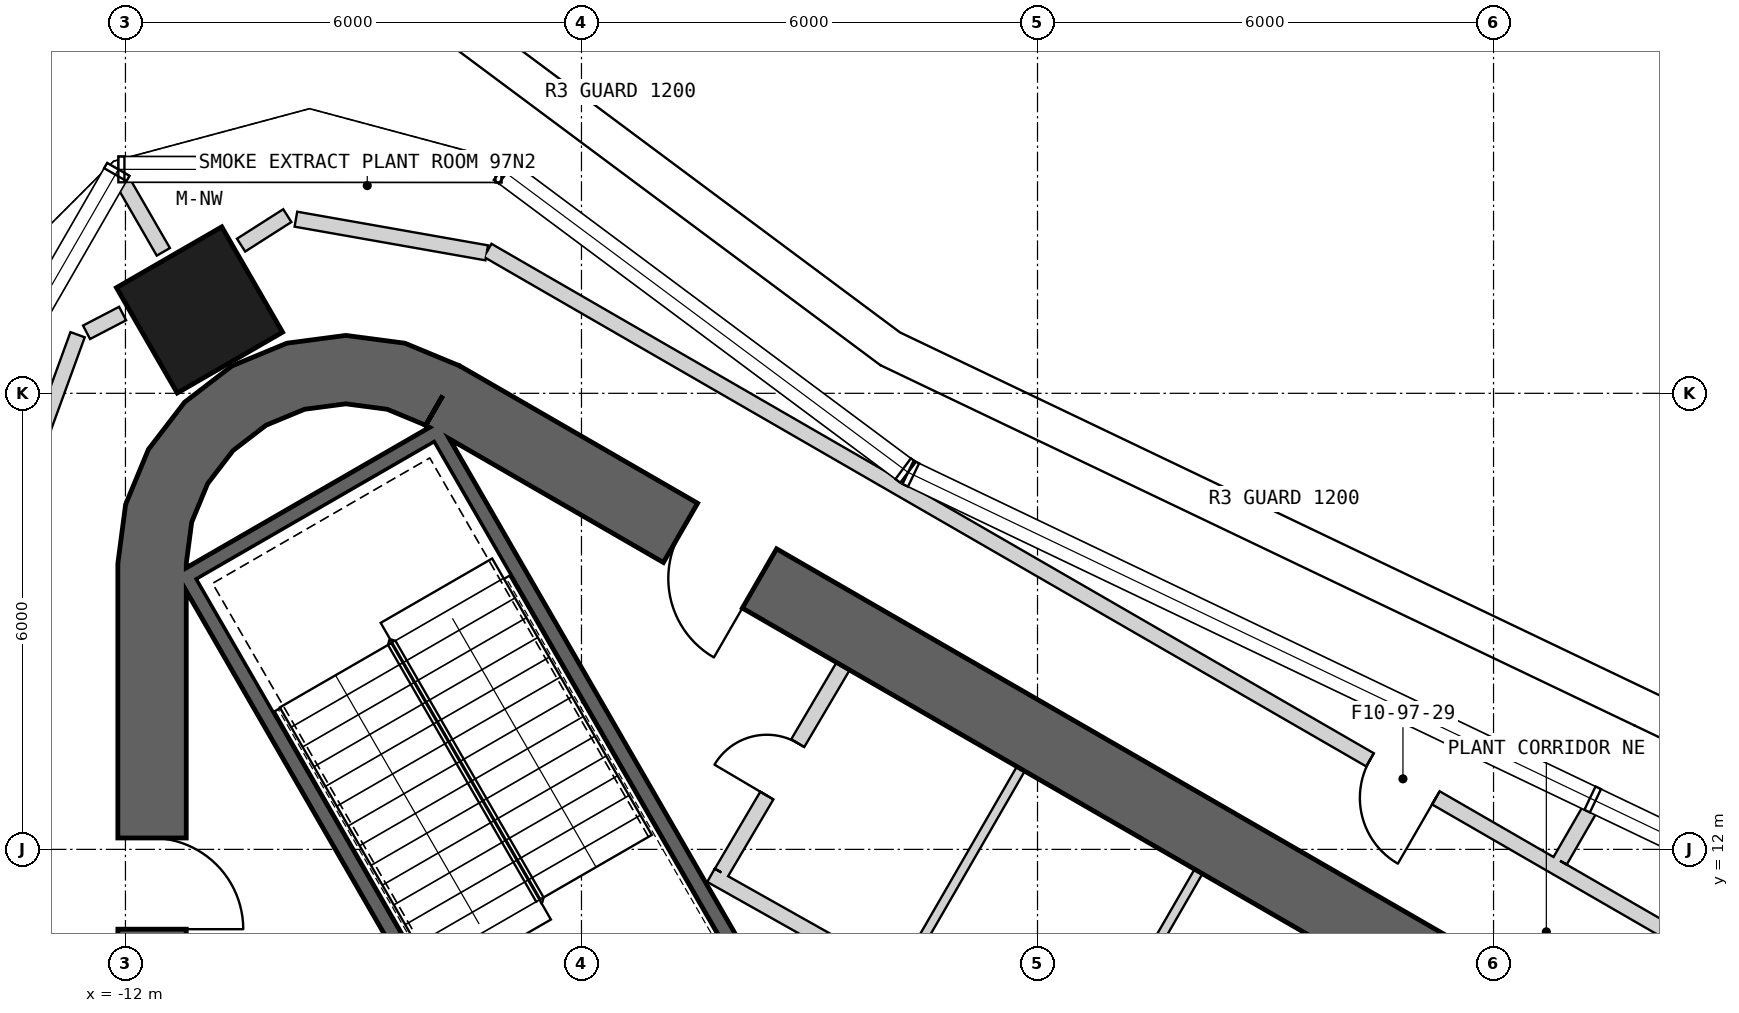
"""IFC4 building model, lengths in metres.
Left out: names, types, materials, properties, quantities, classifications, styles, units other than length and angle.
Written with IfcOpenShell. Run it as: python <this file> out.ifc"""

import sys

from ifc_helpers import new_model, si_unit, direction, frame, frame_2d, origin, origin_2d, place, context, subcontext, project, spatial, polyline, rectangle, outline, extrude, element, fill, save


model = new_model("IFC4")
c1 = context("Model", 3, precision=1e-05, world=origin(), true_north=direction((0.0, 1.0)))
c2 = subcontext(c1, "Body", "Model", "MODEL_VIEW")
j1 = project(units=[si_unit("LENGTHUNIT", "METRE"), si_unit("PLANEANGLEUNIT", "RADIAN")], contexts=[c1])
p1 = place(None, origin())
s1 = spatial("IfcSite", under=j1, at=p1, CompositionType="ELEMENT")
p2 = place(p1, origin())
s2 = spatial("IfcBuilding", under=s1, at=p2, CompositionType="ELEMENT")
p3 = place(p2, frame((0.0, 0.0, 430.3)))
s3 = spatial("IfcBuildingStorey", under=s2, at=p3, CompositionType="ELEMENT", Elevation=430.3)
p4 = place(p3, frame((-11.025, 19.097, 0.0), z_axis=(0.0, 0.0, 1.0), x_axis=(-0.5, 0.866025403784, 0.0)))
e1 = element("IfcColumn", 1, at=p4, inside=s3, PredefinedType="COLUMN", context=c2, shape_type="SweptSolid", body=[
    extrude(rectangle(XDim=1.6, YDim=1.6, at=origin_2d()), origin(), (0.0, 0.0, 1.0), 5.0),
])
p5 = place(p3, frame((19.475, 2.208, 0.0), z_axis=(0.0, 0.0, 1.0), x_axis=(-0.866028369851, 0.499994862586, 0.0)))
e2 = element("IfcWall", 2, at=p5, inside=s3, PredefinedType="SHEAR", context=c2, shape_type="SweptSolid", body=[
    extrude(rectangle(XDim=31.523, YDim=0.9, at=frame_2d((15.762, 0.0))), origin(), (0.0, 0.0, 1.0), 5.0),
])
p6 = place(p5, frame((3.612, 0.0, 0.0)))
e3 = element("IfcOpeningElement", 3, at=p6, cuts=e2, PredefinedType="OPENING", context=c2, shape_type="SweptSolid", body=[
    extrude(rectangle(XDim=1.2, YDim=2.4, at=frame_2d((0.6, 1.2))), frame((0.0, 0.46, 0.0), z_axis=(0.0, -1.0, 0.0), x_axis=(1.0, 0.0, 0.0)), (0.0, 0.0, 1.0), 0.92),
])
p7 = place(p5, frame((26.712, 0.0, 0.0)))
e4 = element("IfcOpeningElement", 4, at=p7, cuts=e2, PredefinedType="OPENING", context=c2, shape_type="SweptSolid", body=[
    extrude(rectangle(XDim=1.2, YDim=2.4, at=frame_2d((0.6, 1.2))), frame((0.0, 0.46, 0.0), z_axis=(0.0, -1.0, 0.0), x_axis=(1.0, 0.0, 0.0)), (0.0, 0.0, 1.0), 0.92),
])
p8 = place(p3, frame((-11.65, 15.762, 0.0), z_axis=(0.0, 0.0, 1.0), x_axis=(0.0, -1.0, 0.0)))
e5 = element("IfcWall", 5, at=p8, inside=s3, PredefinedType="SHEAR", context=c2, shape_type="SweptSolid", body=[
    extrude(rectangle(XDim=31.523, YDim=0.9, at=frame_2d((15.762, 0.0))), origin(), (0.0, 0.0, 1.0), 5.0),
])
p9 = place(p8, frame((3.612, 0.0, 0.0)))
e6 = element("IfcOpeningElement", 6, at=p9, cuts=e5, PredefinedType="OPENING", context=c2, shape_type="SweptSolid", body=[
    extrude(rectangle(XDim=1.2, YDim=2.4, at=frame_2d((0.6, 1.2))), frame((0.0, 0.46, 0.0), z_axis=(0.0, -1.0, 0.0), x_axis=(1.0, 0.0, 0.0)), (0.0, 0.0, 1.0), 0.92),
])
p10 = place(p8, frame((26.712, 0.0, 0.0)))
e7 = element("IfcOpeningElement", 7, at=p10, cuts=e5, PredefinedType="OPENING", context=c2, shape_type="SweptSolid", body=[
    extrude(rectangle(XDim=1.2, YDim=2.4, at=frame_2d((0.6, 1.2))), frame((0.0, 0.46, 0.0), z_axis=(0.0, -1.0, 0.0), x_axis=(1.0, 0.0, 0.0)), (0.0, 0.0, 1.0), 0.92),
])
p11 = place(p3, origin())
e8 = element("IfcWall", 8, at=p11, inside=s3, PredefinedType="SHEAR", context=c2, shape_type="SweptSolid", body=[
    extrude(outline(polyline([(-7.6, 18.36), (-8.323, 18.659), (-9.1, 18.762), (-9.876, 18.659), (-10.6, 18.36), (-11.221, 17.883), (-11.698, 17.262), (-11.998, 16.538), (-12.1, 15.762), (-11.2, 15.762), (-11.128, 16.305), (-10.919, 16.812), (-10.585, 17.247), (-10.15, 17.58), (-9.644, 17.79), (-9.1, 17.862), (-8.556, 17.79), (-8.05, 17.58), (-7.6, 18.36)])), origin(), (0.0, 0.0, 1.0), 5.0),
])
p12 = place(p3, frame((-11.245, 15.678, -0.25), z_axis=(0.0, 0.0, 1.0), x_axis=(0.499977274689, -0.866038523851, 0.0)))
e9 = element("IfcWall", 9, at=p12, inside=s3, PredefinedType="SHEAR", context=c2, shape_type="SweptSolid", body=[
    extrude(rectangle(XDim=8.1, YDim=0.2, at=frame_2d((4.05, 0.0))), origin(), (0.0, 0.0, 1.0), 5.0),
])
p13 = place(p3, frame((-7.818, 17.541, -0.25), z_axis=(0.0, 0.0, 1.0), x_axis=(-0.866044365799, -0.499967155389, 0.0)))
e10 = element("IfcWall", 10, at=p13, inside=s3, PredefinedType="SHEAR", context=c2, shape_type="SweptSolid", body=[
    extrude(rectangle(XDim=3.8, YDim=0.2, at=frame_2d((1.9, 0.0))), origin(), (0.0, 0.0, 1.0), 5.0),
])
p14 = place(p3, frame((-7.854, 17.405, -0.25), z_axis=(0.0, 0.0, 1.0), x_axis=(0.499997992926, -0.866026562566, 0.0)))
e11 = element("IfcWall", 11, at=p14, inside=s3, PredefinedType="SHEAR", context=c2, shape_type="SweptSolid", body=[
    extrude(rectangle(XDim=7.9, YDim=0.2, at=frame_2d((3.95, 0.0))), origin(), (0.0, 0.0, 1.0), 5.0),
])
for number, where, z_axis, x_axis in (
    (12, (2.119, 11.709, 0.0), (0.0, 0.0, 1.0), (-0.5, -0.866, 0.0)),
    (13, (-0.22, 13.06, 0.0), (0.0, 0.0, 1.0), (-0.5, -0.866, 0.0)),
):
    element("IfcWall", number, at=place(p3, frame(where, z_axis=z_axis, x_axis=x_axis)), inside=s3, PredefinedType="PARTITIONING", context=c2, shape_type="SweptSolid", body=[
        extrude(rectangle(XDim=3.25, YDim=0.12, at=frame_2d((1.625, 0.0))), origin(), (0.0, 0.0, 1.0), 4.75),
    ])
p15 = place(p3, frame((-4.296, 11.659, 0.0), z_axis=(0.0, 0.0, 1.0), x_axis=(0.871534483978, -0.490334215854, 0.0)))
e14 = element("IfcWall", 14, at=p15, inside=s3, PredefinedType="PARTITIONING", context=c2, shape_type="SweptSolid", body=[
    extrude(rectangle(XDim=2.7, YDim=0.2, at=frame_2d((1.35, 0.0))), origin(), (0.0, 0.0, 1.0), 4.75),
])
p16 = place(p3, frame((-2.558, 14.409, 0.0), z_axis=(0.0, 0.0, 1.0), x_axis=(-0.508018930956, -0.861345903683, 0.0)))
e15 = element("IfcWall", 15, at=p16, inside=s3, PredefinedType="PARTITIONING", context=c2, shape_type="SweptSolid", body=[
    extrude(rectangle(XDim=3.15, YDim=0.2, at=frame_2d((1.575, 0.0))), origin(), (0.0, 0.0, 1.0), 4.75),
])
p17 = place(p16, frame((1.175, 0.0, 0.0)))
e16 = element("IfcOpeningElement", 16, at=p17, cuts=e15, PredefinedType="OPENING", context=c2, shape_type="SweptSolid", body=[
    extrude(rectangle(XDim=0.8, YDim=2.1, at=frame_2d((0.4, 1.05))), frame((0.0, 0.11, 0.0), z_axis=(0.0, -1.0, 0.0), x_axis=(1.0, 0.0, 0.0)), (0.0, 0.0, 1.0), 0.22),
])
p18 = place(p3, frame((-12.63, 18.771, 0.0), z_axis=(0.0, 0.0, 1.0), x_axis=(-0.342015224264, -0.939694411163, 0.0)))
e17 = element("IfcWall", 17, at=p18, inside=s3, PredefinedType="PARTITIONING", context=c2, shape_type="SweptSolid", body=[
    extrude(rectangle(XDim=2.737, YDim=0.2, at=frame_2d((1.368, 0.0))), origin(), (0.0, 0.0, 1.0), 4.75),
])
p19 = place(p3, frame((-12.038, 19.05, 0.0), z_axis=(0.0, 0.0, 1.0), x_axis=(-0.887186880255, -0.461410272429, 0.0)))
e18 = element("IfcWall", 18, at=p19, inside=s3, PredefinedType="PARTITIONING", context=c2, shape_type="SweptSolid", body=[
    extrude(rectangle(XDim=0.534, YDim=0.2, at=frame_2d((0.267, 0.0))), origin(), (0.0, 0.0, 1.0), 4.75),
])
p20 = place(p3, frame((-11.501, 19.861, 0.0), z_axis=(0.0, 0.0, 1.0), x_axis=(-0.500107244371, 0.865963477364, 0.0)))
e19 = element("IfcWall", 19, at=p20, inside=s3, PredefinedType="PARTITIONING", context=c2, shape_type="SweptSolid", body=[
    extrude(rectangle(XDim=1.098, YDim=0.2, at=frame_2d((0.549, 0.0))), origin(), (0.0, 0.0, 1.0), 3.93),
])
p21 = place(p3, frame((20.834, 3.675, 0.0), z_axis=(0.0, 0.0, 1.0), x_axis=(-0.866028536494, 0.499994573949, 0.0)))
e20 = element("IfcWall", 20, at=p21, inside=s3, PredefinedType="PARTITIONING", context=c2, shape_type="SweptSolid", body=[
    extrude(rectangle(XDim=32.411, YDim=0.2, at=frame_2d((16.206, 0.0))), origin(), (0.0, 0.0, 1.0), 4.75),
])
p22 = place(p21, frame((7.7, 0.0, 0.0)))
e21 = element("IfcOpeningElement", 21, at=p22, cuts=e20, PredefinedType="OPENING", context=c2, shape_type="SweptSolid", body=[
    extrude(rectangle(XDim=1.0, YDim=2.1, at=frame_2d((0.5, 1.05))), frame((0.0, 0.11, 0.0), z_axis=(0.0, -1.0, 0.0), x_axis=(1.0, 0.0, 0.0)), (0.0, 0.0, 1.0), 0.22),
])
p23 = place(p21, frame((18.006, 0.0, 0.0)))
e22 = element("IfcOpeningElement", 22, at=p23, cuts=e20, PredefinedType="OPENING", context=c2, shape_type="SweptSolid", body=[
    extrude(rectangle(XDim=1.0, YDim=2.1, at=frame_2d((0.5, 1.05))), frame((0.0, 0.11, 0.0), z_axis=(0.0, -1.0, 0.0), x_axis=(1.0, 0.0, 0.0)), (0.0, 0.0, 1.0), 0.22),
])
p24 = place(p3, frame((-9.87, 20.337, 0.0), z_axis=(0.0, 0.0, 1.0), x_axis=(-0.843326891705, -0.537400924569, 0.0)))
e23 = element("IfcWall", 23, at=p24, inside=s3, PredefinedType="PARTITIONING", context=c2, shape_type="SweptSolid", body=[
    extrude(rectangle(XDim=0.721, YDim=0.2, at=frame_2d((0.361, 0.0))), origin(), (0.0, 0.0, 1.0), 4.75),
])
p25 = place(p3, frame((-7.246, 19.848, 0.0), z_axis=(0.0, 0.0, 1.0), x_axis=(-0.984816315713, 0.173599609177, 0.0)))
e24 = element("IfcWall", 24, at=p25, inside=s3, PredefinedType="PARTITIONING", context=c2, shape_type="SweptSolid", body=[
    extrude(rectangle(XDim=2.55, YDim=0.2, at=frame_2d((1.275, 0.0))), origin(), (0.0, 0.0, 1.0), 4.75),
])
p26 = place(p3, frame((7.271, 12.534, 0.0), z_axis=(0.0, 0.0, 1.0), x_axis=(-0.500025443912, -0.866010713236, 0.0)))
e25 = element("IfcWall", 25, at=p26, inside=s3, PredefinedType="PARTITIONING", context=c2, shape_type="SweptSolid", body=[
    extrude(rectangle(XDim=0.791, YDim=0.2, at=frame_2d((0.395, 0.0))), origin(), (0.0, 0.0, 1.0), 4.75),
])
p27 = place(p17, origin())
e26 = element("IfcDoor", 26, at=p27, inside=s3, OperationType="SINGLE_SWING_RIGHT", PredefinedType="USERDEFINED", context=c2, shape_type="SweptSolid", body=[
    extrude(rectangle(XDim=0.8, YDim=2.1, at=frame_2d((0.4, 1.05))), frame((0.0, 0.025, 0.0), z_axis=(0.0, -1.0, 0.0), x_axis=(1.0, 0.0, 0.0)), (0.0, 0.0, 1.0), 0.05),
])
fill(e16, e26)
p28 = place(p23, origin())
e27 = element("IfcDoor", 27, at=p28, inside=s3, OperationType="SINGLE_SWING_LEFT", PredefinedType="USERDEFINED", context=c2, shape_type="SweptSolid", body=[
    extrude(rectangle(XDim=1.0, YDim=2.1, at=frame_2d((0.5, 1.05))), frame((0.0, 0.025, 0.0), z_axis=(0.0, -1.0, 0.0), x_axis=(1.0, 0.0, 0.0)), (0.0, 0.0, 1.0), 0.05),
])
fill(e22, e27)
p29 = place(p7, origin())
e28 = element("IfcDoor", 28, at=p29, inside=s3, OperationType="SINGLE_SWING_LEFT", PredefinedType="USERDEFINED", context=c2, shape_type="SweptSolid", body=[
    extrude(rectangle(XDim=1.2, YDim=2.4, at=frame_2d((0.6, 1.2))), frame((0.0, 0.025, 0.0), z_axis=(0.0, -1.0, 0.0), x_axis=(1.0, 0.0, 0.0)), (0.0, 0.0, 1.0), 0.05),
])
fill(e4, e28)
p30 = place(p9, origin())
e29 = element("IfcDoor", 29, at=p30, inside=s3, OperationType="SINGLE_SWING_RIGHT", PredefinedType="USERDEFINED", context=c2, shape_type="SweptSolid", body=[
    extrude(rectangle(XDim=1.2, YDim=2.4, at=frame_2d((0.6, 1.2))), frame((0.0, 0.025, 0.0), z_axis=(0.0, -1.0, 0.0), x_axis=(1.0, 0.0, 0.0)), (0.0, 0.0, 1.0), 0.05),
])
fill(e6, e29)
save(model, sys.argv[1])
